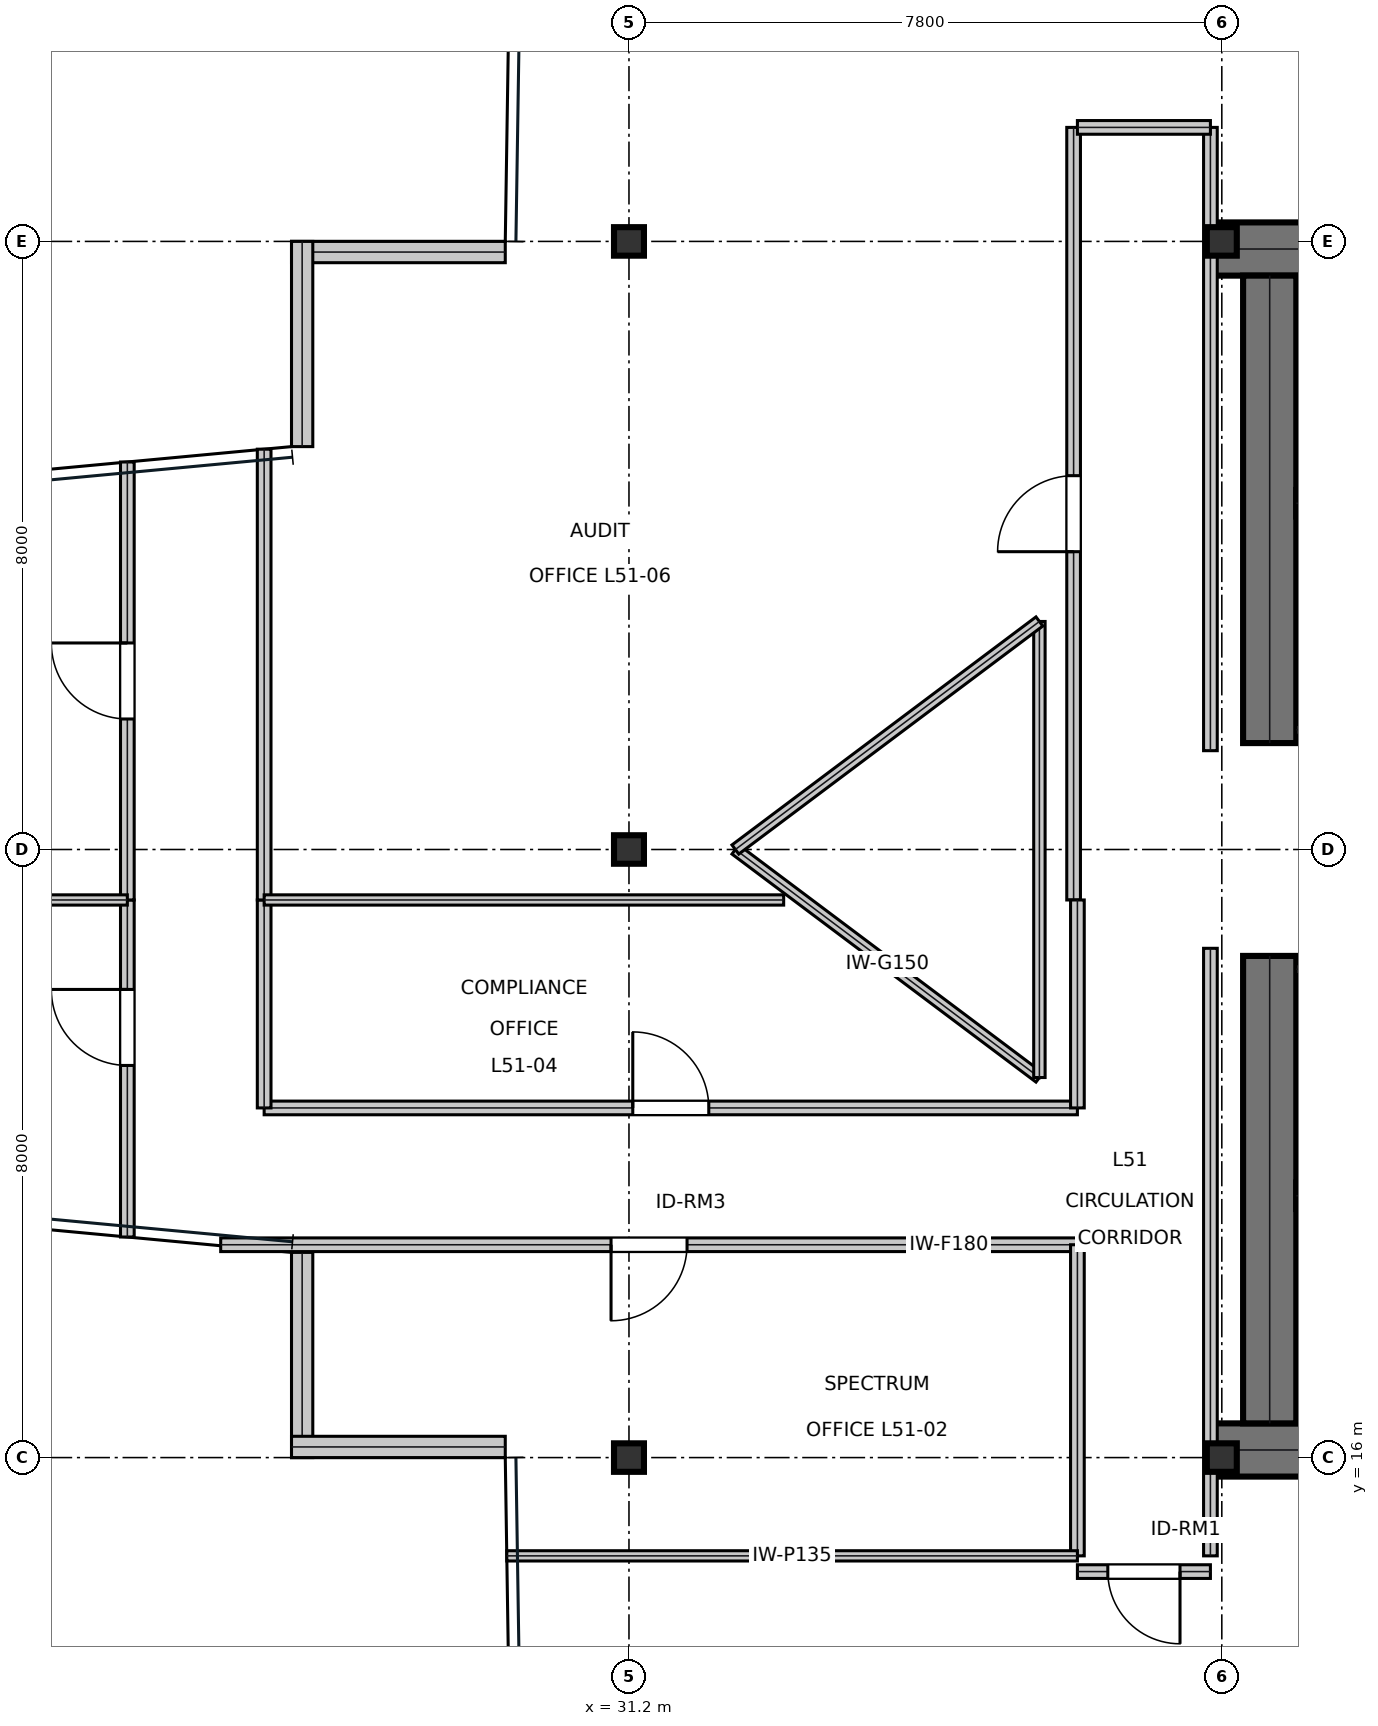
"""IFC4 building model, lengths in metres.
Left out: names, types, materials, properties, quantities, classifications, styles, units other than length and angle.
Written with IfcOpenShell. Run it as: python <this file> out.ifc"""

import sys

from ifc_helpers import new_model, si_unit, direction, frame, frame_2d, origin, origin_2d, place, context, subcontext, project, spatial, rectangle, i_section, extrude, element, fill, save


model = new_model("IFC4")
c1 = context("Model", 3, precision=1e-05, world=origin(), true_north=direction((0.0, 1.0)))
c2 = subcontext(c1, "Body", "Model", "MODEL_VIEW")
j1 = project(units=[si_unit("LENGTHUNIT", "METRE"), si_unit("PLANEANGLEUNIT", "RADIAN")], contexts=[c1])
p1 = place(None, origin())
s1 = spatial("IfcSite", under=j1, at=p1, CompositionType="ELEMENT")
p2 = place(p1, origin())
s2 = spatial("IfcBuilding", under=s1, at=p2, CompositionType="ELEMENT")
p3 = place(p2, frame((0.0, 0.0, 220.2)))
s3 = spatial("IfcBuildingStorey", under=s2, at=p3, CompositionType="ELEMENT", Elevation=220.2)
for number, where, z_axis, x_axis in (
    (1, (38.8, 31.9, 0.0), (0.0, 0.0, 1.0), (1.0, 0.0, 0.0)),
    (2, (38.8, 16.1, 0.0), (0.0, 0.0, 1.0), (1.0, 0.0, 0.0)),
):
    element("IfcWall", number, at=place(p3, frame(where, z_axis=z_axis, x_axis=x_axis)), inside=s3, PredefinedType="SHEAR", context=c2, shape_type="SweptSolid", body=[
        extrude(rectangle(XDim=16.0, YDim=0.7, at=frame_2d((8.0, 0.0))), origin(), (0.0, 0.0, 1.0), 3.79),
    ])
for number, where, z_axis, x_axis in (
    (3, (39.63, 16.45, 0.0), (0.0, 0.0, 1.0), (0.0, 1.0, 0.0)),
    (4, (39.63, 25.4, 0.0), (0.0, 0.0, 1.0), (0.0, 1.0, 0.0)),
):
    element("IfcWall", number, at=place(p3, frame(where, z_axis=z_axis, x_axis=x_axis)), inside=s3, PredefinedType="SHEAR", context=c2, shape_type="SweptSolid", body=[
        extrude(rectangle(XDim=6.15, YDim=0.7, at=frame_2d((3.075, 0.0))), origin(), (0.0, 0.0, 1.0), 3.79),
    ])
p4 = place(p3, frame((39.98, 28.555, 0.0), z_axis=(0.0, 0.0, 1.0), x_axis=(1.0, 0.0, 0.0)))
e5 = element("IfcWall", 5, at=p4, inside=s3, PredefinedType="SHEAR", context=c2, shape_type="SweptSolid", body=[
    extrude(rectangle(XDim=7.71, YDim=0.35, at=frame_2d((3.855, 0.0))), origin(), (0.0, 0.0, 1.0), 3.79),
])
p5 = place(p4, frame((0.25, 0.0, 0.0)))
e6 = element("IfcOpeningElement", 6, at=p5, cuts=e5, PredefinedType="OPENING", context=c2, shape_type="SweptSolid", body=[
    extrude(rectangle(XDim=1.1, YDim=2.15, at=frame_2d((0.55, 1.075))), frame((0.0, 0.185, 0.0), z_axis=(0.0, -1.0, 0.0), x_axis=(1.0, 0.0, 0.0)), (0.0, 0.0, 1.0), 0.37),
])
p6 = place(p3, frame((39.98, 19.445, 0.0), z_axis=(0.0, 0.0, 1.0), x_axis=(1.0, 0.0, 0.0)))
e7 = element("IfcWall", 7, at=p6, inside=s3, PredefinedType="SHEAR", context=c2, shape_type="SweptSolid", body=[
    extrude(rectangle(XDim=7.71, YDim=0.35, at=frame_2d((3.855, 0.0))), origin(), (0.0, 0.0, 1.0), 3.79),
])
p7 = place(p6, frame((0.25, 0.0, 0.0)))
e8 = element("IfcOpeningElement", 8, at=p7, cuts=e7, PredefinedType="OPENING", context=c2, shape_type="SweptSolid", body=[
    extrude(rectangle(XDim=1.1, YDim=2.15, at=frame_2d((0.55, 1.075))), frame((0.0, 0.185, 0.0), z_axis=(0.0, -1.0, 0.0), x_axis=(1.0, 0.0, 0.0)), (0.0, 0.0, 1.0), 0.37),
])
for number, where, z_axis, x_axis in (
    (9, (31.2, 16.0, 0.0), (0.0, 0.0, 1.0), (1.0, 0.0, 0.0)),
    (10, (31.2, 24.0, 0.0), (0.0, 0.0, 1.0), (1.0, 0.0, 0.0)),
    (11, (31.2, 32.0, 0.0), (0.0, 0.0, 1.0), (1.0, 0.0, 0.0)),
    (12, (39.0, 16.0, 0.0), (0.0, 0.0, 1.0), (1.0, 0.0, 0.0)),
    (13, (39.0, 32.0, 0.0), (0.0, 0.0, 1.0), (1.0, 0.0, 0.0)),
):
    element("IfcColumn", number, at=place(p3, frame(where, z_axis=z_axis, x_axis=x_axis)), inside=s3, PredefinedType="COLUMN", context=c2, shape_type="SweptSolid", body=[
        extrude(i_section(OverallWidth=0.394, OverallDepth=0.375, WebThickness=0.017, FlangeThickness=0.028, at=origin_2d()), origin(), (0.0, 0.0, 1.0), 4.044),
    ])
p8 = place(p3, frame((29.573, 31.86, 0.0), z_axis=(0.0, 0.0, 1.0), x_axis=(-1.0, 0.0, 0.0)))
e14 = element("IfcWall", 14, at=p8, inside=s3, PredefinedType="STANDARD", context=c2, shape_type="SweptSolid", body=[
    extrude(rectangle(XDim=2.812, YDim=0.28, at=frame_2d((1.406, 0.0))), origin(), (0.0, 0.0, 1.0), 3.79),
])
for number, where, z_axis, x_axis in (
    (15, (26.9, 32.0, 0.0), (0.0, 0.0, 1.0), (0.0, -1.0, 0.0)),
    (16, (26.9, 18.7, 0.0), (0.0, 0.0, 1.0), (0.0, -1.0, 0.0)),
):
    element("IfcWall", number, at=place(p3, frame(where, z_axis=z_axis, x_axis=x_axis)), inside=s3, PredefinedType="STANDARD", context=c2, shape_type="SweptSolid", body=[
        extrude(rectangle(XDim=2.7, YDim=0.28, at=frame_2d((1.35, 0.0))), origin(), (0.0, 0.0, 1.0), 3.319),
    ])
p9 = place(p3, frame((26.76, 16.14, 0.0), z_axis=(0.0, 0.0, 1.0), x_axis=(1.0, 0.0, 0.0)))
e17 = element("IfcWall", 17, at=p9, inside=s3, PredefinedType="STANDARD", context=c2, shape_type="SweptSolid", body=[
    extrude(rectangle(XDim=2.812, YDim=0.28, at=frame_2d((1.406, 0.0))), origin(), (0.0, 0.0, 1.0), 3.79),
])
p10 = place(p3, frame((39.98, 25.575, 0.0), z_axis=(0.0, 0.0, 1.0), x_axis=(1.0, 0.0, 0.0)))
e18 = element("IfcWall", 18, at=p10, inside=s3, PredefinedType="PARTITIONING", context=c2, shape_type="SweptSolid", body=[
    extrude(rectangle(XDim=5.9, YDim=0.15, at=frame_2d((2.95, 0.0))), origin(), (0.0, 0.0, 1.0), 3.79),
])
p11 = place(p10, frame((2.35, 0.0, 0.0)))
e19 = element("IfcOpeningElement", 19, at=p11, cuts=e18, PredefinedType="OPENING", context=c2, shape_type="SweptSolid", body=[
    extrude(rectangle(XDim=1.05, YDim=2.15, at=frame_2d((0.525, 1.075))), frame((0.0, 0.085, 0.0), z_axis=(0.0, -1.0, 0.0), x_axis=(1.0, 0.0, 0.0)), (0.0, 0.0, 1.0), 0.17),
])
p12 = place(p3, frame((39.98, 22.425, 0.0), z_axis=(0.0, 0.0, 1.0), x_axis=(1.0, 0.0, 0.0)))
e20 = element("IfcWall", 20, at=p12, inside=s3, PredefinedType="PARTITIONING", context=c2, shape_type="SweptSolid", body=[
    extrude(rectangle(XDim=5.9, YDim=0.15, at=frame_2d((2.95, 0.0))), origin(), (0.0, 0.0, 1.0), 3.79),
])
p13 = place(p12, frame((2.35, 0.0, 0.0)))
e21 = element("IfcOpeningElement", 21, at=p13, cuts=e20, PredefinedType="OPENING", context=c2, shape_type="SweptSolid", body=[
    extrude(rectangle(XDim=1.05, YDim=2.15, at=frame_2d((0.525, 1.075))), frame((0.0, 0.085, 0.0), z_axis=(0.0, -1.0, 0.0), x_axis=(1.0, 0.0, 0.0)), (0.0, 0.0, 1.0), 0.17),
])
p14 = place(p3, frame((37.1, 14.5, 0.0), z_axis=(0.0, 0.0, 1.0), x_axis=(1.0, 0.0, 0.0)))
e22 = element("IfcWall", 22, at=p14, inside=s3, PredefinedType="SOLIDWALL", context=c2, shape_type="SweptSolid", body=[
    extrude(rectangle(XDim=1.75, YDim=0.18, at=frame_2d((0.875, 0.0))), origin(), (0.0, 0.0, 1.0), 3.241),
])
p15 = place(p14, frame((0.4, 0.0, 0.0)))
e23 = element("IfcOpeningElement", 23, at=p15, cuts=e22, PredefinedType="OPENING", context=c2, shape_type="SweptSolid", body=[
    extrude(rectangle(XDim=0.95, YDim=2.15, at=frame_2d((0.475, 1.075))), frame((0.0, 0.1, 0.0), z_axis=(0.0, -1.0, 0.0), x_axis=(1.0, 0.0, 0.0)), (0.0, 0.0, 1.0), 0.2),
])
p16 = place(p3, frame((25.828, 18.8, 0.0), z_axis=(0.0, 0.0, 1.0), x_axis=(1.0, 0.0, 0.0)))
e24 = element("IfcWall", 24, at=p16, inside=s3, PredefinedType="SOLIDWALL", context=c2, shape_type="SweptSolid", body=[
    extrude(rectangle(XDim=11.272, YDim=0.18, at=frame_2d((5.636, 0.0))), origin(), (0.0, 0.0, 1.0), 3.241),
])
p17 = place(p16, frame((5.136, 0.0, 0.0)))
e25 = element("IfcOpeningElement", 25, at=p17, cuts=e24, PredefinedType="OPENING", context=c2, shape_type="SweptSolid", body=[
    extrude(rectangle(XDim=1.0, YDim=2.15, at=frame_2d((0.5, 1.075))), frame((0.0, 0.1, 0.0), z_axis=(0.0, -1.0, 0.0), x_axis=(1.0, 0.0, 0.0)), (0.0, 0.0, 1.0), 0.2),
])
p18 = place(p3, frame((24.6, 18.902, 0.0), z_axis=(0.0, 0.0, 1.0), x_axis=(0.0, 1.0, 0.0)))
e26 = element("IfcWall", 26, at=p18, inside=s3, PredefinedType="SOLIDWALL", context=c2, shape_type="SweptSolid", body=[
    extrude(rectangle(XDim=4.434, YDim=0.18, at=frame_2d((2.217, 0.0))), origin(), (0.0, 0.0, 1.0), 3.241),
])
p19 = place(p18, frame((2.257, 0.0, 0.0)))
e27 = element("IfcOpeningElement", 27, at=p19, cuts=e26, PredefinedType="OPENING", context=c2, shape_type="SweptSolid", body=[
    extrude(rectangle(XDim=1.0, YDim=2.15, at=frame_2d((0.5, 1.075))), frame((0.0, 0.1, 0.0), z_axis=(0.0, -1.0, 0.0), x_axis=(1.0, 0.0, 0.0)), (0.0, 0.0, 1.0), 0.2),
])
p20 = place(p3, frame((26.4, 20.6, 0.0), z_axis=(0.0, 0.0, 1.0), x_axis=(1.0, 0.0, 0.0)))
e28 = element("IfcWall", 28, at=p20, inside=s3, PredefinedType="SOLIDWALL", context=c2, shape_type="SweptSolid", body=[
    extrude(rectangle(XDim=10.7, YDim=0.18, at=frame_2d((5.35, 0.0))), origin(), (0.0, 0.0, 1.0), 3.241),
])
p21 = place(p20, frame((4.85, 0.0, 0.0)))
e29 = element("IfcOpeningElement", 29, at=p21, cuts=e28, PredefinedType="OPENING", context=c2, shape_type="SweptSolid", body=[
    extrude(rectangle(XDim=1.0, YDim=2.15, at=frame_2d((0.5, 1.075))), frame((0.0, 0.1, 0.0), z_axis=(0.0, -1.0, 0.0), x_axis=(1.0, 0.0, 0.0)), (0.0, 0.0, 1.0), 0.2),
])
p22 = place(p3, frame((24.6, 23.336, 0.0), z_axis=(0.0, 0.0, 1.0), x_axis=(0.0, 1.0, 0.0)))
e30 = element("IfcWall", 30, at=p22, inside=s3, PredefinedType="SOLIDWALL", context=c2, shape_type="SweptSolid", body=[
    extrude(rectangle(XDim=5.762, YDim=0.18, at=frame_2d((2.881, 0.0))), origin(), (0.0, 0.0, 1.0), 3.241),
])
p23 = place(p22, frame((2.381, 0.0, 0.0)))
e31 = element("IfcOpeningElement", 31, at=p23, cuts=e30, PredefinedType="OPENING", context=c2, shape_type="SweptSolid", body=[
    extrude(rectangle(XDim=1.0, YDim=2.15, at=frame_2d((0.5, 1.075))), frame((0.0, 0.1, 0.0), z_axis=(0.0, -1.0, 0.0), x_axis=(1.0, 0.0, 0.0)), (0.0, 0.0, 1.0), 0.2),
])
p24 = place(p3, frame((37.05, 23.336, 0.0), z_axis=(0.0, 0.0, 1.0), x_axis=(0.0, 1.0, 0.0)))
e32 = element("IfcWall", 32, at=p24, inside=s3, PredefinedType="SOLIDWALL", context=c2, shape_type="SweptSolid", body=[
    extrude(rectangle(XDim=10.164, YDim=0.18, at=frame_2d((5.082, 0.0))), origin(), (0.0, 0.0, 1.0), 3.241),
])
p25 = place(p24, frame((4.582, 0.0, 0.0)))
e33 = element("IfcOpeningElement", 33, at=p25, cuts=e32, PredefinedType="OPENING", context=c2, shape_type="SweptSolid", body=[
    extrude(rectangle(XDim=1.0, YDim=2.15, at=frame_2d((0.5, 1.075))), frame((0.0, 0.1, 0.0), z_axis=(0.0, -1.0, 0.0), x_axis=(1.0, 0.0, 0.0)), (0.0, 0.0, 1.0), 0.2),
])
p26 = place(p3, frame((38.85, 14.707, 0.0), z_axis=(0.0, 0.0, 1.0), x_axis=(0.0, 1.0, 0.0)))
e34 = element("IfcWall", 34, at=p26, inside=s3, PredefinedType="SOLIDWALL", context=c2, shape_type="SweptSolid", body=[
    extrude(rectangle(XDim=7.993, YDim=0.18, at=frame_2d((3.997, 0.0))), origin(), (0.0, 0.0, 1.0), 3.241),
])
p27 = place(p3, frame((37.1, 14.707, 0.0), z_axis=(0.0, 0.0, 1.0), x_axis=(0.0, 1.0, 0.0)))
e35 = element("IfcWall", 35, at=p27, inside=s3, PredefinedType="SOLIDWALL", context=c2, shape_type="SweptSolid", body=[
    extrude(rectangle(XDim=4.093, YDim=0.18, at=frame_2d((2.046, 0.0))), origin(), (0.0, 0.0, 1.0), 3.241),
])
p28 = place(p3, frame((26.4, 20.6, 0.0), z_axis=(0.0, 0.0, 1.0), x_axis=(0.0, 1.0, 0.0)))
e36 = element("IfcWall", 36, at=p28, inside=s3, PredefinedType="SOLIDWALL", context=c2, shape_type="SweptSolid", body=[
    extrude(rectangle(XDim=2.736, YDim=0.18, at=frame_2d((1.368, 0.0))), origin(), (0.0, 0.0, 1.0), 3.241),
])
p29 = place(p3, frame((37.1, 20.6, 0.0), z_axis=(0.0, 0.0, 1.0), x_axis=(0.0, 1.0, 0.0)))
e37 = element("IfcWall", 37, at=p29, inside=s3, PredefinedType="SOLIDWALL", context=c2, shape_type="SweptSolid", body=[
    extrude(rectangle(XDim=2.736, YDim=0.18, at=frame_2d((1.368, 0.0))), origin(), (0.0, 0.0, 1.0), 3.79),
])
p30 = place(p3, frame((38.85, 25.3, 0.0), z_axis=(0.0, 0.0, 1.0), x_axis=(0.0, 1.0, 0.0)))
e38 = element("IfcWall", 38, at=p30, inside=s3, PredefinedType="SOLIDWALL", context=c2, shape_type="SweptSolid", body=[
    extrude(rectangle(XDim=8.2, YDim=0.18, at=frame_2d((4.1, 0.0))), origin(), (0.0, 0.0, 1.0), 3.241),
])
p31 = place(p3, frame((26.4, 23.336, 0.0), z_axis=(0.0, 0.0, 1.0), x_axis=(0.0, 1.0, 0.0)))
e39 = element("IfcWall", 39, at=p31, inside=s3, PredefinedType="SOLIDWALL", context=c2, shape_type="SweptSolid", body=[
    extrude(rectangle(XDim=5.931, YDim=0.18, at=frame_2d((2.965, 0.0))), origin(), (0.0, 0.0, 1.0), 3.241),
])
p32 = place(p3, frame((37.1, 33.5, 0.0), z_axis=(0.0, 0.0, 1.0), x_axis=(1.0, 0.0, 0.0)))
e40 = element("IfcWall", 40, at=p32, inside=s3, PredefinedType="SOLIDWALL", context=c2, shape_type="SweptSolid", body=[
    extrude(rectangle(XDim=1.75, YDim=0.18, at=frame_2d((0.875, 0.0))), origin(), (0.0, 0.0, 1.0), 3.241),
])
p33 = place(p3, frame((29.592, 14.707, 0.0), z_axis=(0.0, 0.0, 1.0), x_axis=(1.0, 0.0, 0.0)))
e41 = element("IfcWall", 41, at=p33, inside=s3, PredefinedType="PARTITIONING", context=c2, shape_type="SweptSolid", body=[
    extrude(rectangle(XDim=7.508, YDim=0.135, at=frame_2d((3.754, 0.0))), origin(), (0.0, 0.0, 1.0), 3.319),
])
p34 = place(p3, frame((13.54, 23.336, 0.0), z_axis=(0.0, 0.0, 1.0), x_axis=(1.0, 0.0, 0.0)))
e42 = element("IfcWall", 42, at=p34, inside=s3, PredefinedType="PARTITIONING", context=c2, shape_type="SweptSolid", body=[
    extrude(rectangle(XDim=11.06, YDim=0.135, at=frame_2d((5.53, 0.0))), origin(), (0.0, 0.0, 1.0), 3.319),
])
p35 = place(p3, frame((26.4, 23.336, 0.0), z_axis=(0.0, 0.0, 1.0), x_axis=(1.0, 0.0, 0.0)))
e43 = element("IfcWall", 43, at=p35, inside=s3, PredefinedType="PARTITIONING", context=c2, shape_type="SweptSolid", body=[
    extrude(rectangle(XDim=6.835, YDim=0.135, at=frame_2d((3.418, 0.0))), origin(), (0.0, 0.0, 1.0), 3.241),
])
p36 = place(p3, frame((32.6, 24.0, 0.0), z_axis=(0.0, 0.0, 1.0), x_axis=(0.8, -0.6, 0.0)))
e44 = element("IfcWall", 44, at=p36, inside=s3, PredefinedType="MOVABLE", context=c2, shape_type="SweptSolid", body=[
    extrude(rectangle(XDim=5.0, YDim=0.15, at=frame_2d((2.5, 0.0))), origin(), (0.0, 0.0, 1.0), 3.79),
])
p37 = place(p3, frame((36.6, 21.0, 0.0), z_axis=(0.0, 0.0, 1.0), x_axis=(0.0, 1.0, 0.0)))
e45 = element("IfcWall", 45, at=p37, inside=s3, PredefinedType="MOVABLE", context=c2, shape_type="SweptSolid", body=[
    extrude(rectangle(XDim=6.0, YDim=0.15, at=frame_2d((3.0, 0.0))), origin(), (0.0, 0.0, 1.0), 3.79),
])
p38 = place(p3, frame((36.6, 27.0, 0.0), z_axis=(0.0, 0.0, 1.0), x_axis=(-0.8, -0.6, 0.0)))
e46 = element("IfcWall", 46, at=p38, inside=s3, PredefinedType="MOVABLE", context=c2, shape_type="SweptSolid", body=[
    extrude(rectangle(XDim=5.0, YDim=0.15, at=frame_2d((2.5, 0.0))), origin(), (0.0, 0.0, 1.0), 3.79),
])
p39 = place(p15, frame((0.95, 0.0, 0.0), z_axis=(0.0, 0.0, 1.0), x_axis=(-1.0, 0.0, 0.0)))
e47 = element("IfcDoor", 47, at=p39, inside=s3, OperationType="SINGLE_SWING_LEFT", PredefinedType="DOOR", context=c2, shape_type="SweptSolid", body=[
    extrude(rectangle(XDim=0.95, YDim=2.15, at=frame_2d((0.475, 1.075))), frame((0.0, 0.025, 0.0), z_axis=(0.0, -1.0, 0.0), x_axis=(1.0, 0.0, 0.0)), (0.0, 0.0, 1.0), 0.05),
])
fill(e23, e47)
p40 = place(p17, frame((1.0, 0.0, 0.0), z_axis=(0.0, 0.0, 1.0), x_axis=(-1.0, 0.0, 0.0)))
e48 = element("IfcDoor", 48, at=p40, inside=s3, OperationType="SINGLE_SWING_RIGHT", PredefinedType="DOOR", context=c2, shape_type="SweptSolid", body=[
    extrude(rectangle(XDim=1.0, YDim=2.15, at=frame_2d((0.5, 1.075))), frame((0.0, 0.025, 0.0), z_axis=(0.0, -1.0, 0.0), x_axis=(1.0, 0.0, 0.0)), (0.0, 0.0, 1.0), 0.05),
])
fill(e25, e48)
p41 = place(p19, origin())
e49 = element("IfcDoor", 49, at=p41, inside=s3, OperationType="SINGLE_SWING_RIGHT", PredefinedType="DOOR", context=c2, shape_type="SweptSolid", body=[
    extrude(rectangle(XDim=1.0, YDim=2.15, at=frame_2d((0.5, 1.075))), frame((0.0, 0.025, 0.0), z_axis=(0.0, -1.0, 0.0), x_axis=(1.0, 0.0, 0.0)), (0.0, 0.0, 1.0), 0.05),
])
fill(e27, e49)
p42 = place(p21, origin())
e50 = element("IfcDoor", 50, at=p42, inside=s3, OperationType="SINGLE_SWING_LEFT", PredefinedType="DOOR", context=c2, shape_type="SweptSolid", body=[
    extrude(rectangle(XDim=1.0, YDim=2.15, at=frame_2d((0.5, 1.075))), frame((0.0, 0.025, 0.0), z_axis=(0.0, -1.0, 0.0), x_axis=(1.0, 0.0, 0.0)), (0.0, 0.0, 1.0), 0.05),
])
fill(e29, e50)
p43 = place(p23, origin())
e51 = element("IfcDoor", 51, at=p43, inside=s3, OperationType="SINGLE_SWING_RIGHT", PredefinedType="DOOR", context=c2, shape_type="SweptSolid", body=[
    extrude(rectangle(XDim=1.0, YDim=2.15, at=frame_2d((0.5, 1.075))), frame((0.0, 0.025, 0.0), z_axis=(0.0, -1.0, 0.0), x_axis=(1.0, 0.0, 0.0)), (0.0, 0.0, 1.0), 0.05),
])
fill(e31, e51)
p44 = place(p25, origin())
e52 = element("IfcDoor", 52, at=p44, inside=s3, OperationType="SINGLE_SWING_LEFT", PredefinedType="DOOR", context=c2, shape_type="SweptSolid", body=[
    extrude(rectangle(XDim=1.0, YDim=2.15, at=frame_2d((0.5, 1.075))), frame((0.0, 0.025, 0.0), z_axis=(0.0, -1.0, 0.0), x_axis=(1.0, 0.0, 0.0)), (0.0, 0.0, 1.0), 0.05),
])
fill(e33, e52)
save(model, sys.argv[1])
